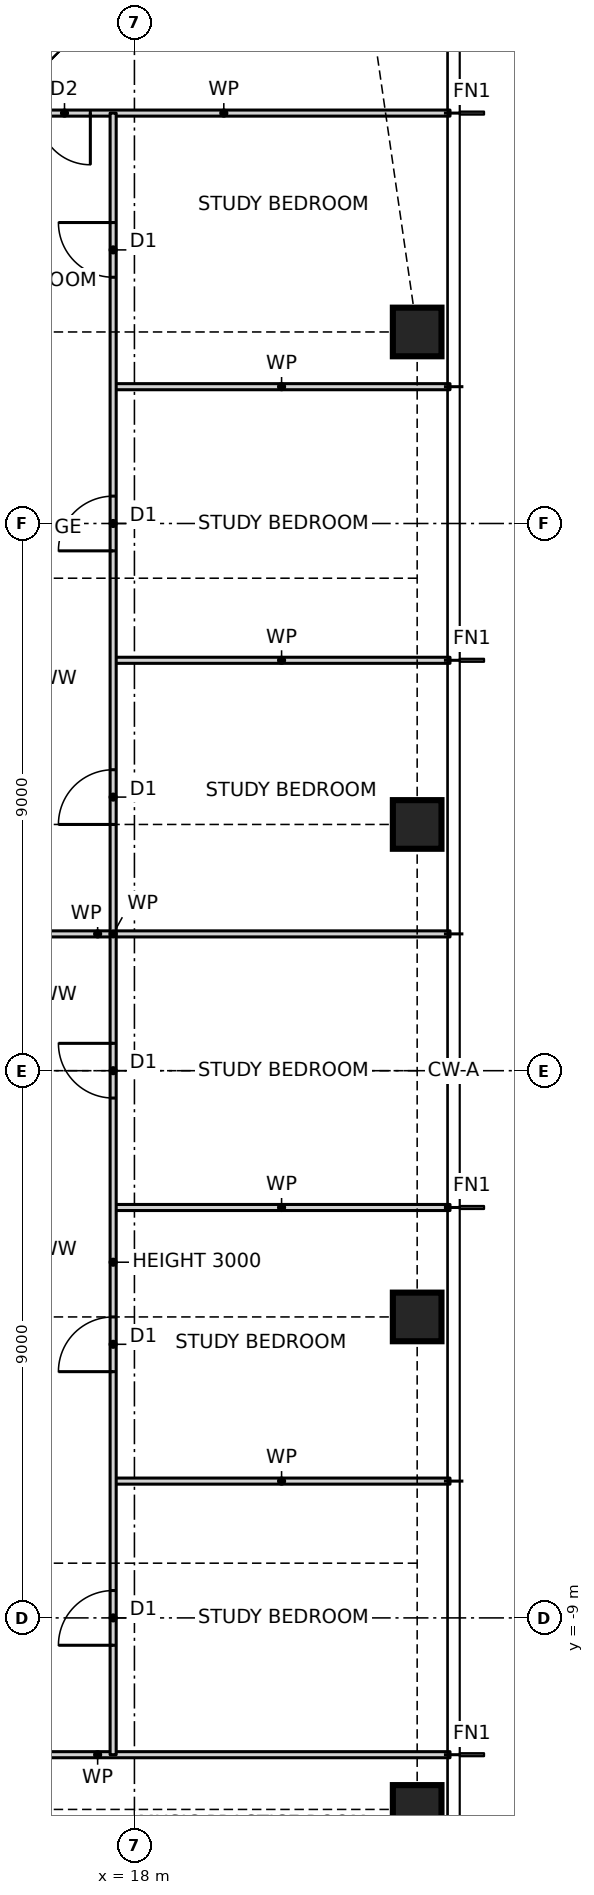
"""IFC4 building model, lengths in metres.
Left out: names, types, materials, properties, quantities, classifications, styles, units other than length and angle.
Written with IfcOpenShell. Run it as: python <this file> out.ifc"""

import sys

from ifc_helpers import new_model, si_unit, direction, frame, frame_2d, origin, origin_2d, place, context, subcontext, project, spatial, rectangle, hollow_rectangle, extrude, element, fill, save


model = new_model("IFC4")
c1 = context("Model", 3, precision=1e-05, world=origin(), true_north=direction((0.0, 1.0)))
c2 = subcontext(c1, "Body", "Model", "MODEL_VIEW")
j1 = project(units=[si_unit("LENGTHUNIT", "METRE"), si_unit("PLANEANGLEUNIT", "RADIAN")], contexts=[c1])
p1 = place(None, origin())
s1 = spatial("IfcSite", under=j1, at=p1, CompositionType="ELEMENT")
p2 = place(p1, origin())
s2 = spatial("IfcBuilding", under=s1, at=p2, CompositionType="ELEMENT")
p3 = place(p2, frame((0.0, 0.0, 39.5)))
s3 = spatial("IfcBuildingStorey", under=s2, at=p3, CompositionType="ELEMENT", Elevation=39.5)
for number, where, z_axis, x_axis in (
    (1, (22.65, -12.15, 0.0), (0.0, 0.0, 1.0), (1.0, 0.0, 0.0)),
    (2, (22.65, -4.05, 0.0), (0.0, 0.0, 1.0), (1.0, 0.0, 0.0)),
    (3, (22.65, 4.05, 0.0), (0.0, 0.0, 1.0), (1.0, 0.0, 0.0)),
    (4, (22.65, 12.15, 0.0), (0.0, 0.0, 1.0), (1.0, 0.0, 0.0)),
):
    element("IfcColumn", number, at=place(p3, frame(where, z_axis=z_axis, x_axis=x_axis)), inside=s3, PredefinedType="COLUMN", context=c2, shape_type="SweptSolid", body=[
        extrude(hollow_rectangle(XDim=0.8, YDim=0.8, WallThickness=0.09, at=origin_2d()), origin(), (0.0, 0.0, 1.0), 3.5),
    ])
p4 = place(p3, frame((11.6, -11.25, 0.0), z_axis=(0.0, 0.0, 1.0), x_axis=(1.0, 0.0, 0.0)))
e5 = element("IfcWall", 5, at=p4, inside=s3, PredefinedType="PARTITIONING", context=c2, shape_type="SweptSolid", body=[
    extrude(rectangle(XDim=11.59, YDim=0.1, at=frame_2d((5.795, 0.0))), origin(), (0.0, 0.0, 1.0), 3.27),
])
p5 = place(p4, frame((1.325, 0.0, 0.0)))
e6 = element("IfcOpeningElement", 6, at=p5, cuts=e5, PredefinedType="OPENING", context=c2, shape_type="SweptSolid", body=[
    extrude(rectangle(XDim=1.8, YDim=2.1, at=frame_2d((0.9, 1.05))), frame((0.0, 0.06, 0.0), z_axis=(0.0, -1.0, 0.0), x_axis=(1.0, 0.0, 0.0)), (0.0, 0.0, 1.0), 0.12),
])
for number, where, z_axis, x_axis in (
    (7, (17.65, -6.75, 0.0), (0.0, 0.0, 1.0), (1.0, 0.0, 0.0)),
    (8, (17.65, -2.25, 0.0), (0.0, 0.0, 1.0), (1.0, 0.0, 0.0)),
):
    element("IfcWall", number, at=place(p3, frame(where, z_axis=z_axis, x_axis=x_axis)), inside=s3, PredefinedType="PARTITIONING", context=c2, shape_type="SweptSolid", body=[
        extrude(rectangle(XDim=5.54, YDim=0.1, at=frame_2d((2.77, 0.0))), origin(), (0.0, 0.0, 1.0), 3.27),
    ])
p6 = place(p3, frame((11.6, 2.25, 0.0), z_axis=(0.0, 0.0, 1.0), x_axis=(1.0, 0.0, 0.0)))
e9 = element("IfcWall", 9, at=p6, inside=s3, PredefinedType="PARTITIONING", context=c2, shape_type="SweptSolid", body=[
    extrude(rectangle(XDim=11.59, YDim=0.1, at=frame_2d((5.795, 0.0))), origin(), (0.0, 0.0, 1.0), 3.27),
])
for number, where, z_axis, x_axis in (
    (10, (17.65, 6.75, 0.0), (0.0, 0.0, 1.0), (1.0, 0.0, 0.0)),
    (11, (17.65, 11.25, 0.0), (0.0, 0.0, 1.0), (1.0, 0.0, 0.0)),
):
    element("IfcWall", number, at=place(p3, frame(where, z_axis=z_axis, x_axis=x_axis)), inside=s3, PredefinedType="PARTITIONING", context=c2, shape_type="SweptSolid", body=[
        extrude(rectangle(XDim=5.54, YDim=0.1, at=frame_2d((2.77, 0.0))), origin(), (0.0, 0.0, 1.0), 3.27),
    ])
p7 = place(p3, frame((15.75, 15.75, 0.0), z_axis=(0.0, 0.0, 1.0), x_axis=(1.0, 0.0, 0.0)))
e12 = element("IfcWall", 12, at=p7, inside=s3, PredefinedType="PARTITIONING", context=c2, shape_type="SweptSolid", body=[
    extrude(rectangle(XDim=7.44, YDim=0.1, at=frame_2d((3.72, 0.0))), origin(), (0.0, 0.0, 1.0), 3.27),
])
p8 = place(p7, frame((0.675, 0.0, 0.0)))
e13 = element("IfcOpeningElement", 13, at=p8, cuts=e12, PredefinedType="OPENING", context=c2, shape_type="SweptSolid", body=[
    extrude(rectangle(XDim=0.85, YDim=2.1, at=frame_2d((0.425, 1.05))), frame((0.0, 0.06, 0.0), z_axis=(0.0, -1.0, 0.0), x_axis=(1.0, 0.0, 0.0)), (0.0, 0.0, 1.0), 0.12),
])
p9 = place(p3, frame((17.65, -11.25, 0.0), z_axis=(0.0, 0.0, 1.0), x_axis=(0.0, 1.0, 0.0)))
e14 = element("IfcWall", 14, at=p9, inside=s3, PredefinedType="PARTITIONING", context=c2, shape_type="SweptSolid", body=[
    extrude(rectangle(XDim=27.0, YDim=0.1, at=frame_2d((13.5, 0.0))), origin(), (0.0, 0.0, 1.0), 3.0),
])
p10 = place(p9, frame((1.8, 0.0, 0.0)))
e15 = element("IfcOpeningElement", 15, at=p10, cuts=e14, PredefinedType="OPENING", context=c2, shape_type="SweptSolid", body=[
    extrude(rectangle(XDim=0.9, YDim=2.1, at=frame_2d((0.45, 1.05))), frame((0.0, 0.06, 0.0), z_axis=(0.0, -1.0, 0.0), x_axis=(1.0, 0.0, 0.0)), (0.0, 0.0, 1.0), 0.12),
])
p11 = place(p9, frame((6.3, 0.0, 0.0)))
e16 = element("IfcOpeningElement", 16, at=p11, cuts=e14, PredefinedType="OPENING", context=c2, shape_type="SweptSolid", body=[
    extrude(rectangle(XDim=0.9, YDim=2.1, at=frame_2d((0.45, 1.05))), frame((0.0, 0.06, 0.0), z_axis=(0.0, -1.0, 0.0), x_axis=(1.0, 0.0, 0.0)), (0.0, 0.0, 1.0), 0.12),
])
p12 = place(p9, frame((10.8, 0.0, 0.0)))
e17 = element("IfcOpeningElement", 17, at=p12, cuts=e14, PredefinedType="OPENING", context=c2, shape_type="SweptSolid", body=[
    extrude(rectangle(XDim=0.9, YDim=2.1, at=frame_2d((0.45, 1.05))), frame((0.0, 0.06, 0.0), z_axis=(0.0, -1.0, 0.0), x_axis=(1.0, 0.0, 0.0)), (0.0, 0.0, 1.0), 0.12),
])
p13 = place(p9, frame((15.3, 0.0, 0.0)))
e18 = element("IfcOpeningElement", 18, at=p13, cuts=e14, PredefinedType="OPENING", context=c2, shape_type="SweptSolid", body=[
    extrude(rectangle(XDim=0.9, YDim=2.1, at=frame_2d((0.45, 1.05))), frame((0.0, 0.06, 0.0), z_axis=(0.0, -1.0, 0.0), x_axis=(1.0, 0.0, 0.0)), (0.0, 0.0, 1.0), 0.12),
])
p14 = place(p9, frame((19.8, 0.0, 0.0)))
e19 = element("IfcOpeningElement", 19, at=p14, cuts=e14, PredefinedType="OPENING", context=c2, shape_type="SweptSolid", body=[
    extrude(rectangle(XDim=0.9, YDim=2.1, at=frame_2d((0.45, 1.05))), frame((0.0, 0.06, 0.0), z_axis=(0.0, -1.0, 0.0), x_axis=(1.0, 0.0, 0.0)), (0.0, 0.0, 1.0), 0.12),
])
p15 = place(p9, frame((24.3, 0.0, 0.0)))
e20 = element("IfcOpeningElement", 20, at=p15, cuts=e14, PredefinedType="OPENING", context=c2, shape_type="SweptSolid", body=[
    extrude(rectangle(XDim=0.9, YDim=2.1, at=frame_2d((0.45, 1.05))), frame((0.0, 0.06, 0.0), z_axis=(0.0, -1.0, 0.0), x_axis=(1.0, 0.0, 0.0)), (0.0, 0.0, 1.0), 0.12),
])
p16 = place(p10, origin())
e21 = element("IfcDoor", 21, at=p16, inside=s3, OperationType="SINGLE_SWING_LEFT", PredefinedType="DOOR", context=c2, shape_type="SweptSolid", body=[
    extrude(rectangle(XDim=0.9, YDim=2.1, at=frame_2d((0.45, 1.05))), frame((0.0, 0.025, 0.0), z_axis=(0.0, -1.0, 0.0), x_axis=(1.0, 0.0, 0.0)), (0.0, 0.0, 1.0), 0.05),
])
fill(e15, e21)
p17 = place(p11, origin())
e22 = element("IfcDoor", 22, at=p17, inside=s3, OperationType="SINGLE_SWING_LEFT", PredefinedType="DOOR", context=c2, shape_type="SweptSolid", body=[
    extrude(rectangle(XDim=0.9, YDim=2.1, at=frame_2d((0.45, 1.05))), frame((0.0, 0.025, 0.0), z_axis=(0.0, -1.0, 0.0), x_axis=(1.0, 0.0, 0.0)), (0.0, 0.0, 1.0), 0.05),
])
fill(e16, e22)
p18 = place(p12, origin())
e23 = element("IfcDoor", 23, at=p18, inside=s3, OperationType="SINGLE_SWING_RIGHT", PredefinedType="DOOR", context=c2, shape_type="SweptSolid", body=[
    extrude(rectangle(XDim=0.9, YDim=2.1, at=frame_2d((0.45, 1.05))), frame((0.0, 0.025, 0.0), z_axis=(0.0, -1.0, 0.0), x_axis=(1.0, 0.0, 0.0)), (0.0, 0.0, 1.0), 0.05),
])
fill(e17, e23)
p19 = place(p13, origin())
e24 = element("IfcDoor", 24, at=p19, inside=s3, OperationType="SINGLE_SWING_LEFT", PredefinedType="DOOR", context=c2, shape_type="SweptSolid", body=[
    extrude(rectangle(XDim=0.9, YDim=2.1, at=frame_2d((0.45, 1.05))), frame((0.0, 0.025, 0.0), z_axis=(0.0, -1.0, 0.0), x_axis=(1.0, 0.0, 0.0)), (0.0, 0.0, 1.0), 0.05),
])
fill(e18, e24)
p20 = place(p14, origin())
e25 = element("IfcDoor", 25, at=p20, inside=s3, OperationType="SINGLE_SWING_LEFT", PredefinedType="DOOR", context=c2, shape_type="SweptSolid", body=[
    extrude(rectangle(XDim=0.9, YDim=2.1, at=frame_2d((0.45, 1.05))), frame((0.0, 0.025, 0.0), z_axis=(0.0, -1.0, 0.0), x_axis=(1.0, 0.0, 0.0)), (0.0, 0.0, 1.0), 0.05),
])
fill(e19, e25)
p21 = place(p15, origin())
e26 = element("IfcDoor", 26, at=p21, inside=s3, OperationType="SINGLE_SWING_RIGHT", PredefinedType="DOOR", context=c2, shape_type="SweptSolid", body=[
    extrude(rectangle(XDim=0.9, YDim=2.1, at=frame_2d((0.45, 1.05))), frame((0.0, 0.025, 0.0), z_axis=(0.0, -1.0, 0.0), x_axis=(1.0, 0.0, 0.0)), (0.0, 0.0, 1.0), 0.05),
])
fill(e20, e26)
p22 = place(p8, frame((0.85, 0.0, 0.0), z_axis=(0.0, 0.0, 1.0), x_axis=(-1.0, 0.0, 0.0)))
e27 = element("IfcDoor", 27, at=p22, inside=s3, OperationType="SINGLE_SWING_LEFT", PredefinedType="DOOR", context=c2, shape_type="SweptSolid", body=[
    extrude(rectangle(XDim=0.85, YDim=2.1, at=frame_2d((0.425, 1.05))), frame((0.0, 0.025, 0.0), z_axis=(0.0, -1.0, 0.0), x_axis=(1.0, 0.0, 0.0)), (0.0, 0.0, 1.0), 0.05),
])
fill(e13, e27)
save(model, sys.argv[1])
